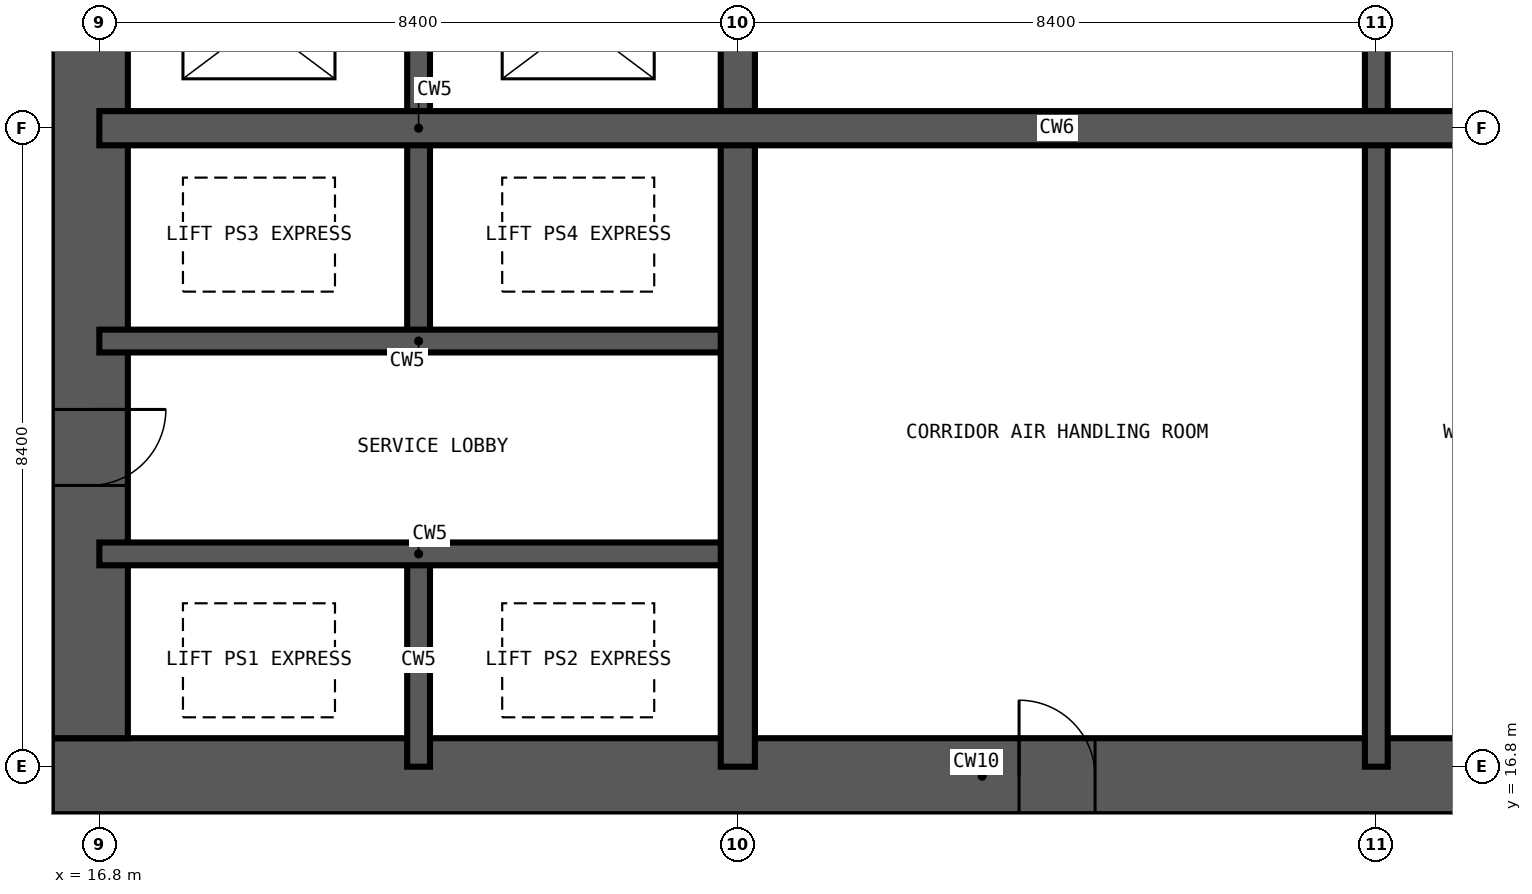
"""IFC4 building model, lengths in metres.
Left out: names, types, materials, properties, quantities, classifications, styles, units other than length and angle.
Written with IfcOpenShell. Run it as: python <this file> out.ifc"""

import sys

from ifc_helpers import new_model, si_unit, direction, frame, frame_2d, origin, place, context, subcontext, project, spatial, rectangle, extrude, element, fill, save


model = new_model("IFC4")
c1 = context("Model", 3, precision=1e-05, world=origin(), true_north=direction((0.0, 1.0)))
c2 = subcontext(c1, "Body", "Model", "MODEL_VIEW")
j1 = project(units=[si_unit("LENGTHUNIT", "METRE"), si_unit("PLANEANGLEUNIT", "RADIAN")], contexts=[c1])
p1 = place(None, origin())
s1 = spatial("IfcSite", under=j1, at=p1, CompositionType="ELEMENT")
p2 = place(p1, origin())
s2 = spatial("IfcBuilding", under=s1, at=p2, CompositionType="ELEMENT")
p3 = place(p2, frame((0.0, 0.0, 133.2)))
s3 = spatial("IfcBuildingStorey", under=s2, at=p3, CompositionType="ELEMENT", Elevation=133.2)
p4 = place(p3, frame((16.175, 16.675, -0.35), z_axis=(0.0, 0.0, 1.0), x_axis=(1.0, 0.0, 0.0)))
e1 = element("IfcWall", 1, at=p4, inside=s3, PredefinedType="SHEAR", context=c2, shape_type="SweptSolid", body=[
    extrude(rectangle(XDim=26.45, YDim=1.0, at=frame_2d((13.225, 0.0))), origin(), (0.0, 0.0, 1.0), 3.6),
])
p5 = place(p4, frame((12.725, 0.0, 0.35)))
e2 = element("IfcOpeningElement", 2, at=p5, cuts=e1, PredefinedType="OPENING", context=c2, shape_type="SweptSolid", body=[
    extrude(rectangle(XDim=1.0, YDim=2.1, at=frame_2d((0.5, 1.05))), frame((0.0, 0.51, 0.0), z_axis=(0.0, -1.0, 0.0), x_axis=(1.0, 0.0, 0.0)), (0.0, 0.0, 1.0), 1.02),
])
p6 = place(p4, frame((19.025, 0.0, 0.35)))
e3 = element("IfcOpeningElement", 3, at=p6, cuts=e1, PredefinedType="OPENING", context=c2, shape_type="SweptSolid", body=[
    extrude(rectangle(XDim=1.0, YDim=2.1, at=frame_2d((0.5, 1.05))), frame((0.0, 0.51, 0.0), z_axis=(0.0, -1.0, 0.0), x_axis=(1.0, 0.0, 0.0)), (0.0, 0.0, 1.0), 1.02),
])
p7 = place(p3, frame((16.675, 41.625, -0.35), z_axis=(0.0, 0.0, 1.0), x_axis=(0.0, -1.0, 0.0)))
e4 = element("IfcWall", 4, at=p7, inside=s3, PredefinedType="SHEAR", context=c2, shape_type="SweptSolid", body=[
    extrude(rectangle(XDim=24.45, YDim=1.0, at=frame_2d((12.225, 0.0))), origin(), (0.0, 0.0, 1.0), 3.6),
])
p8 = place(p7, frame((11.325, 0.0, 0.35)))
e5 = element("IfcOpeningElement", 5, at=p8, cuts=e4, PredefinedType="OPENING", context=c2, shape_type="SweptSolid", body=[
    extrude(rectangle(XDim=1.8, YDim=2.2, at=frame_2d((0.9, 1.1))), frame((0.0, 0.51, 0.0), z_axis=(0.0, -1.0, 0.0), x_axis=(1.0, 0.0, 0.0)), (0.0, 0.0, 1.0), 1.02),
])
p9 = place(p7, frame((20.125, 0.0, 0.35)))
e6 = element("IfcOpeningElement", 6, at=p9, cuts=e4, PredefinedType="OPENING", context=c2, shape_type="SweptSolid", body=[
    extrude(rectangle(XDim=1.0, YDim=2.1, at=frame_2d((0.5, 1.05))), frame((0.0, 0.51, 0.0), z_axis=(0.0, -1.0, 0.0), x_axis=(1.0, 0.0, 0.0)), (0.0, 0.0, 1.0), 1.02),
])
p10 = place(p7, frame((5.425, 0.0, 0.35)))
e7 = element("IfcOpeningElement", 7, at=p10, cuts=e4, PredefinedType="OPENING", context=c2, shape_type="SweptSolid", body=[
    extrude(rectangle(XDim=1.0, YDim=2.1, at=frame_2d((0.5, 1.05))), frame((0.0, 0.51, 0.0), z_axis=(0.0, -1.0, 0.0), x_axis=(1.0, 0.0, 0.0)), (0.0, 0.0, 1.0), 1.02),
])
p11 = place(p3, frame((21.0, 16.8, -0.35), z_axis=(0.0, 0.0, 1.0), x_axis=(0.0, 1.0, 0.0)))
e8 = element("IfcWall", 8, at=p11, inside=s3, PredefinedType="SHEAR", context=c2, shape_type="SweptSolid", body=[
    extrude(rectangle(XDim=2.8, YDim=0.3, at=frame_2d((1.4, 0.0))), origin(), (0.0, 0.0, 1.0), 3.6),
])
p12 = place(p3, frame((21.0, 22.4, -0.35), z_axis=(0.0, 0.0, 1.0), x_axis=(0.0, 1.0, 0.0)))
e9 = element("IfcWall", 9, at=p12, inside=s3, PredefinedType="SHEAR", context=c2, shape_type="SweptSolid", body=[
    extrude(rectangle(XDim=5.6, YDim=0.3, at=frame_2d((2.8, 0.0))), origin(), (0.0, 0.0, 1.0), 3.6),
])
p13 = place(p3, frame((33.6, 16.8, -0.35), z_axis=(0.0, 0.0, 1.0), x_axis=(0.0, 1.0, 0.0)))
e10 = element("IfcWall", 10, at=p13, inside=s3, PredefinedType="SHEAR", context=c2, shape_type="SweptSolid", body=[
    extrude(rectangle(XDim=25.2, YDim=0.3, at=frame_2d((12.6, 0.0))), origin(), (0.0, 0.0, 1.0), 3.6),
])
p14 = place(p13, frame((22.5, 0.0, 0.35)))
e11 = element("IfcOpeningElement", 11, at=p14, cuts=e10, PredefinedType="OPENING", context=c2, shape_type="SweptSolid", body=[
    extrude(rectangle(XDim=1.2, YDim=2.2, at=frame_2d((0.6, 1.1))), frame((0.0, 0.16, 0.0), z_axis=(0.0, -1.0, 0.0), x_axis=(1.0, 0.0, 0.0)), (0.0, 0.0, 1.0), 0.32),
])
p15 = place(p13, frame((18.3, 0.0, 0.35)))
e12 = element("IfcOpeningElement", 12, at=p15, cuts=e10, PredefinedType="OPENING", context=c2, shape_type="SweptSolid", body=[
    extrude(rectangle(XDim=1.2, YDim=2.2, at=frame_2d((0.6, 1.1))), frame((0.0, 0.16, 0.0), z_axis=(0.0, -1.0, 0.0), x_axis=(1.0, 0.0, 0.0)), (0.0, 0.0, 1.0), 0.32),
])
for number, where, z_axis, x_axis in (
    (13, (16.8, 19.6, -0.35), (0.0, 0.0, 1.0), (1.0, 0.0, 0.0)),
    (14, (16.8, 22.4, -0.35), (0.0, 0.0, 1.0), (1.0, 0.0, 0.0)),
):
    element("IfcWall", number, at=place(p3, frame(where, z_axis=z_axis, x_axis=x_axis)), inside=s3, PredefinedType="SHEAR", context=c2, shape_type="SweptSolid", body=[
        extrude(rectangle(XDim=8.4, YDim=0.3, at=frame_2d((4.2, 0.0))), origin(), (0.0, 0.0, 1.0), 3.6),
    ])
p16 = place(p3, frame((25.2, 16.8, -0.35), z_axis=(0.0, 0.0, 1.0), x_axis=(0.0, 1.0, 0.0)))
e15 = element("IfcWall", 15, at=p16, inside=s3, PredefinedType="SHEAR", context=c2, shape_type="SweptSolid", body=[
    extrude(rectangle(XDim=25.2, YDim=0.45, at=frame_2d((12.6, 0.0))), origin(), (0.0, 0.0, 1.0), 3.6),
])
p17 = place(p16, frame((12.1, 0.0, 0.35)))
e16 = element("IfcOpeningElement", 16, at=p17, cuts=e15, PredefinedType="OPENING", context=c2, shape_type="SweptSolid", body=[
    extrude(rectangle(XDim=1.0, YDim=2.1, at=frame_2d((0.5, 1.05))), frame((0.0, 0.235, 0.0), z_axis=(0.0, -1.0, 0.0), x_axis=(1.0, 0.0, 0.0)), (0.0, 0.0, 1.0), 0.47),
])
p18 = place(p3, frame((16.8, 25.2, -0.35), z_axis=(0.0, 0.0, 1.0), x_axis=(1.0, 0.0, 0.0)))
e17 = element("IfcWall", 17, at=p18, inside=s3, PredefinedType="SHEAR", context=c2, shape_type="SweptSolid", body=[
    extrude(rectangle(XDim=25.2, YDim=0.45, at=frame_2d((12.6, 0.0))), origin(), (0.0, 0.0, 1.0), 3.6),
])
p19 = place(p9, origin())
e18 = element("IfcDoor", 18, at=p19, inside=s3, OperationType="SINGLE_SWING_LEFT", PredefinedType="DOOR", context=c2, shape_type="SweptSolid", body=[
    extrude(rectangle(XDim=1.0, YDim=2.1, at=frame_2d((0.5, 1.05))), frame((0.0, 0.025, 0.0), z_axis=(0.0, -1.0, 0.0), x_axis=(1.0, 0.0, 0.0)), (0.0, 0.0, 1.0), 0.05),
])
fill(e6, e18)
p20 = place(p5, origin())
e19 = element("IfcDoor", 19, at=p20, inside=s3, OperationType="SINGLE_SWING_LEFT", PredefinedType="DOOR", context=c2, shape_type="SweptSolid", body=[
    extrude(rectangle(XDim=1.0, YDim=2.1, at=frame_2d((0.5, 1.05))), frame((0.0, 0.025, 0.0), z_axis=(0.0, -1.0, 0.0), x_axis=(1.0, 0.0, 0.0)), (0.0, 0.0, 1.0), 0.05),
])
fill(e2, e19)
save(model, sys.argv[1])
